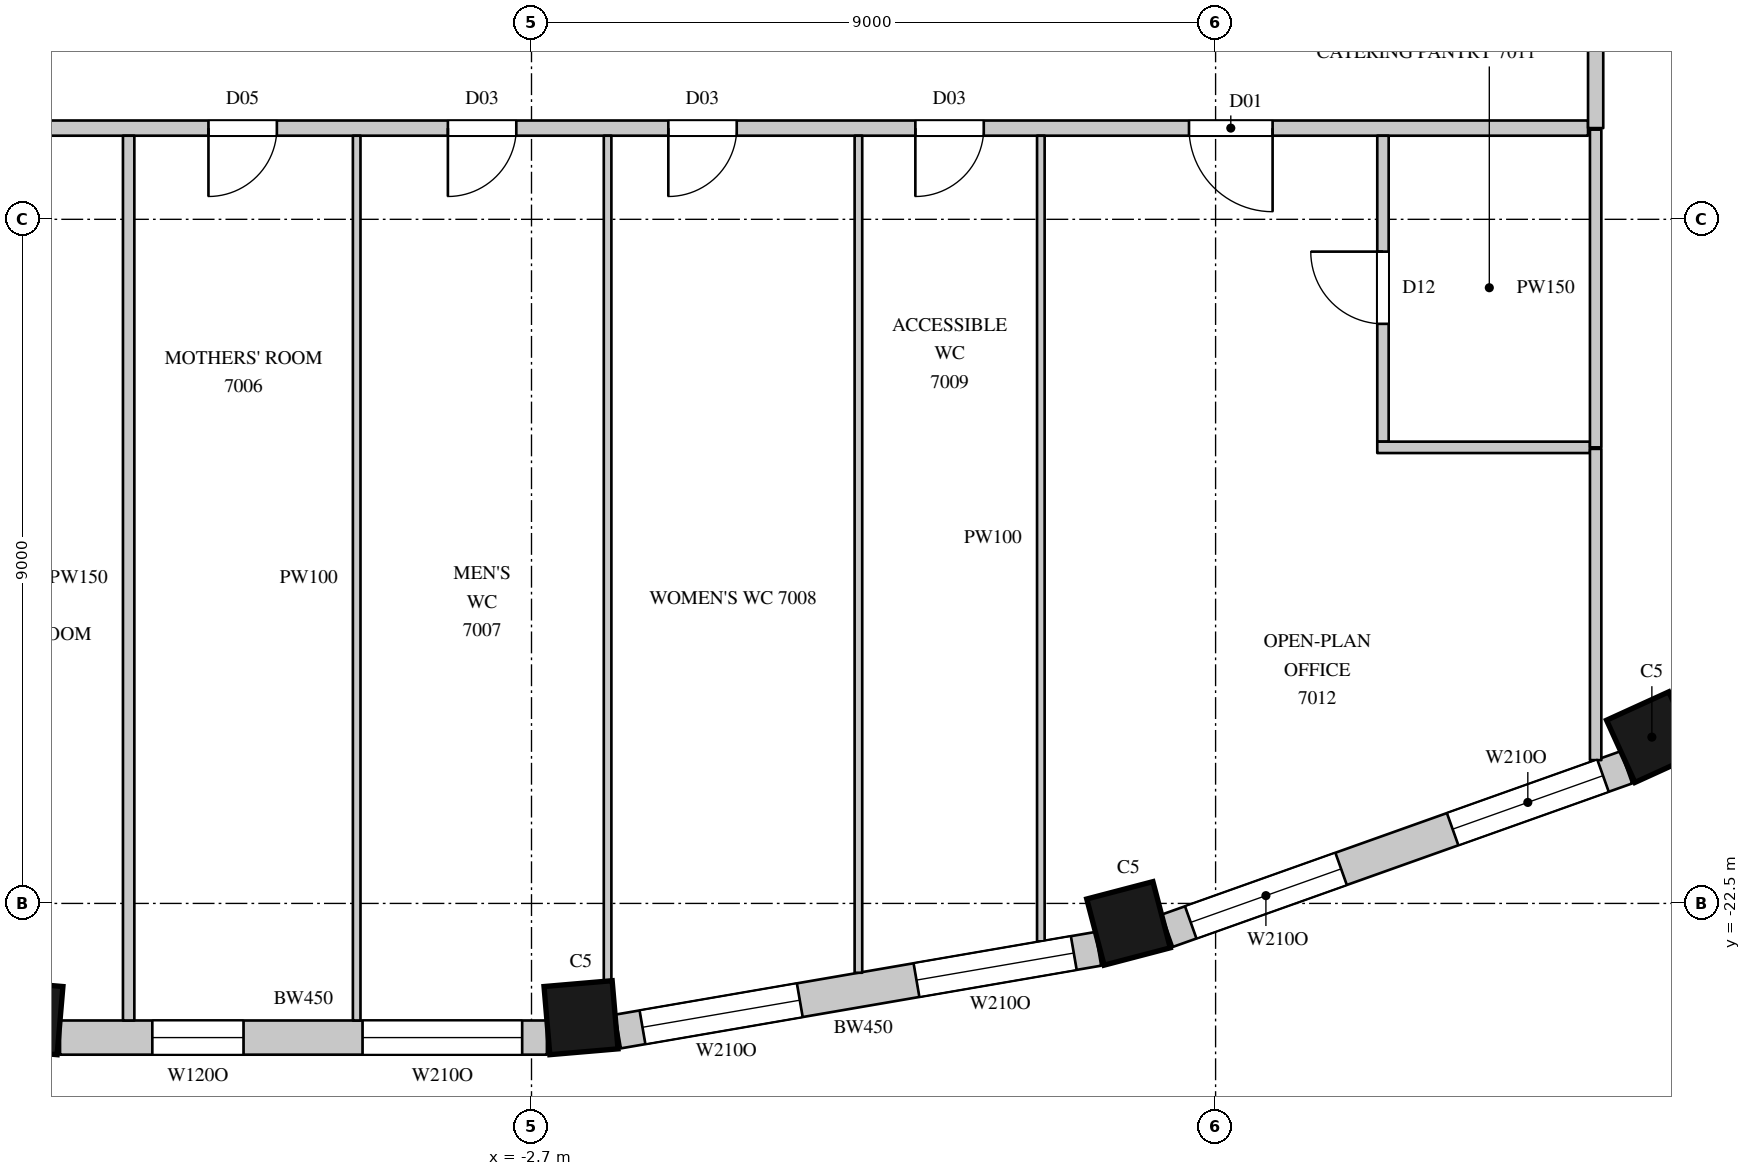
"""IFC4 building model, lengths in metres.
Left out: names, types, materials, properties, quantities, classifications, styles, units other than length and angle.
Written with IfcOpenShell. Run it as: python <this file> out.ifc"""

import sys

from ifc_helpers import new_model, si_unit, direction, frame, frame_2d, origin, origin_2d, place, context, subcontext, project, spatial, rectangle, extrude, element, fill, save


model = new_model("IFC4")
c1 = context("Model", 3, precision=1e-05, world=origin(), true_north=direction((0.0, 1.0)))
c2 = subcontext(c1, "Body", "Model", "MODEL_VIEW")
j1 = project(units=[si_unit("LENGTHUNIT", "METRE"), si_unit("PLANEANGLEUNIT", "RADIAN")], contexts=[c1])
p1 = place(None, origin())
s1 = spatial("IfcSite", under=j1, at=p1, CompositionType="ELEMENT")
p2 = place(p1, origin())
s2 = spatial("IfcBuilding", under=s1, at=p2, CompositionType="ELEMENT")
p3 = place(p2, frame((0.0, 0.0, 309.0)))
s3 = spatial("IfcBuildingStorey", under=s2, at=p3, CompositionType="ELEMENT", Elevation=309.0)
for number, where, z_axis, x_axis in (
    (1, (-9.351, -24.003, 0.0), (0.0, 0.0, 1.0), (0.996, -0.085, 0.0)),
    (2, (-2.049, -24.003, 0.0), (0.0, 0.0, 1.0), (0.996, 0.085, 0.0)),
    (3, (5.154, -22.763, 0.0), (0.0, 0.0, 1.0), (0.967, 0.253, 0.0)),
    (4, (12.04, -20.312, 0.0), (0.0, 0.0, 1.0), (0.91, 0.415, 0.0)),
):
    element("IfcColumn", number, at=place(p3, frame(where, z_axis=z_axis, x_axis=x_axis)), inside=s3, PredefinedType="COLUMN", context=c2, shape_type="SweptSolid", body=[
        extrude(rectangle(XDim=0.9, YDim=0.9, at=origin_2d()), origin(), (0.0, 0.0, 1.0), 4.1),
    ])
p4 = place(p3, frame((-8.903, -24.265, 0.0), z_axis=(0.0, 0.0, 1.0), x_axis=(1.0, 0.0, 0.0)))
e5 = element("IfcWall", 5, at=p4, inside=s3, PredefinedType="SOLIDWALL", context=c2, shape_type="SweptSolid", body=[
    extrude(rectangle(XDim=6.406, YDim=0.45, at=frame_2d((3.203, 0.0))), origin(), (0.0, 0.0, 1.0), 3.8),
])
p5 = place(p4, frame((3.98, 0.0, 1.05)))
e6 = element("IfcOpeningElement", 6, at=p5, cuts=e5, PredefinedType="OPENING", context=c2, shape_type="SweptSolid", body=[
    extrude(rectangle(XDim=2.1, YDim=2.4, at=frame_2d((1.05, 1.2))), frame((0.0, 0.235, 0.0), z_axis=(0.0, -1.0, 0.0), x_axis=(1.0, 0.0, 0.0)), (0.0, 0.0, 1.0), 0.47),
])
p6 = place(p4, frame((1.214, 0.0, 1.05)))
e7 = element("IfcOpeningElement", 7, at=p6, cuts=e5, PredefinedType="OPENING", context=c2, shape_type="SweptSolid", body=[
    extrude(rectangle(XDim=1.2, YDim=2.4, at=frame_2d((0.6, 1.2))), frame((0.0, 0.235, 0.0), z_axis=(0.0, -1.0, 0.0), x_axis=(1.0, 0.0, 0.0)), (0.0, 0.0, 1.0), 0.47),
])
p7 = place(p3, frame((-1.562, -24.185, 0.0), z_axis=(0.0, 0.0, 1.0), x_axis=(0.985502073964, 0.169663379113, 0.0)))
e8 = element("IfcWall", 8, at=p7, inside=s3, PredefinedType="SOLIDWALL", context=c2, shape_type="SweptSolid", body=[
    extrude(rectangle(XDim=6.412, YDim=0.45, at=frame_2d((3.206, 0.0))), origin(), (0.0, 0.0, 1.0), 3.8),
])
p8 = place(p7, frame((0.327, 0.0, 1.05)))
e9 = element("IfcOpeningElement", 9, at=p8, cuts=e8, PredefinedType="OPENING", context=c2, shape_type="SweptSolid", body=[
    extrude(rectangle(XDim=2.1, YDim=2.4, at=frame_2d((1.05, 1.2))), frame((0.0, 0.235, 0.0), z_axis=(0.0, -1.0, 0.0), x_axis=(1.0, 0.0, 0.0)), (0.0, 0.0, 1.0), 0.47),
])
p9 = place(p7, frame((3.985, 0.0, 1.05)))
e10 = element("IfcOpeningElement", 10, at=p9, cuts=e8, PredefinedType="OPENING", context=c2, shape_type="SweptSolid", body=[
    extrude(rectangle(XDim=2.1, YDim=2.4, at=frame_2d((1.05, 1.2))), frame((0.0, 0.235, 0.0), z_axis=(0.0, -1.0, 0.0), x_axis=(1.0, 0.0, 0.0)), (0.0, 0.0, 1.0), 0.47),
])
p10 = place(p3, frame((5.665, -22.859, 0.0), z_axis=(0.0, 0.0, 1.0), x_axis=(0.942108340262, 0.335308626803, 0.0)))
e11 = element("IfcWall", 11, at=p10, inside=s3, PredefinedType="SOLIDWALL", context=c2, shape_type="SweptSolid", body=[
    extrude(rectangle(XDim=6.412, YDim=0.45, at=frame_2d((3.206, 0.0))), origin(), (0.0, 0.0, 1.0), 3.8),
])
p11 = place(p10, frame((0.327, 0.0, 1.05)))
e12 = element("IfcOpeningElement", 12, at=p11, cuts=e11, PredefinedType="OPENING", context=c2, shape_type="SweptSolid", body=[
    extrude(rectangle(XDim=2.1, YDim=2.4, at=frame_2d((1.05, 1.2))), frame((0.0, 0.235, 0.0), z_axis=(0.0, -1.0, 0.0), x_axis=(1.0, 0.0, 0.0)), (0.0, 0.0, 1.0), 0.47),
])
p12 = place(p10, frame((3.985, 0.0, 1.05)))
e13 = element("IfcOpeningElement", 13, at=p12, cuts=e11, PredefinedType="OPENING", context=c2, shape_type="SweptSolid", body=[
    extrude(rectangle(XDim=2.1, YDim=2.4, at=frame_2d((1.05, 1.2))), frame((0.0, 0.235, 0.0), z_axis=(0.0, -1.0, 0.0), x_axis=(1.0, 0.0, 0.0)), (0.0, 0.0, 1.0), 0.47),
])
p13 = place(p3, frame((-10.9, -12.3, 0.0), z_axis=(0.0, 0.0, 1.0), x_axis=(1.0, 0.0, 0.0)))
e14 = element("IfcWall", 14, at=p13, inside=s3, PredefinedType="PARTITIONING", context=c2, shape_type="SweptSolid", body=[
    extrude(rectangle(XDim=22.1, YDim=0.2, at=frame_2d((11.05, 0.0))), origin(), (0.0, 0.0, 1.0), 3.8),
])
p14 = place(p13, frame((0.95, 0.0, 0.0)))
e15 = element("IfcOpeningElement", 15, at=p14, cuts=e14, PredefinedType="OPENING", context=c2, shape_type="SweptSolid", body=[
    extrude(rectangle(XDim=0.9, YDim=2.2, at=frame_2d((0.45, 1.1))), frame((0.0, 0.11, 0.0), z_axis=(0.0, -1.0, 0.0), x_axis=(1.0, 0.0, 0.0)), (0.0, 0.0, 1.0), 0.22),
])
p15 = place(p13, frame((3.95, 0.0, 0.0)))
e16 = element("IfcOpeningElement", 16, at=p15, cuts=e14, PredefinedType="OPENING", context=c2, shape_type="SweptSolid", body=[
    extrude(rectangle(XDim=0.9, YDim=2.2, at=frame_2d((0.45, 1.1))), frame((0.0, 0.11, 0.0), z_axis=(0.0, -1.0, 0.0), x_axis=(1.0, 0.0, 0.0)), (0.0, 0.0, 1.0), 0.22),
])
p16 = place(p13, frame((7.1, 0.0, 0.0)))
e17 = element("IfcOpeningElement", 17, at=p16, cuts=e14, PredefinedType="OPENING", context=c2, shape_type="SweptSolid", body=[
    extrude(rectangle(XDim=0.9, YDim=2.2, at=frame_2d((0.45, 1.1))), frame((0.0, 0.11, 0.0), z_axis=(0.0, -1.0, 0.0), x_axis=(1.0, 0.0, 0.0)), (0.0, 0.0, 1.0), 0.22),
])
p17 = place(p13, frame((10.0, 0.0, 0.0)))
e18 = element("IfcOpeningElement", 18, at=p17, cuts=e14, PredefinedType="OPENING", context=c2, shape_type="SweptSolid", body=[
    extrude(rectangle(XDim=0.9, YDim=2.2, at=frame_2d((0.45, 1.1))), frame((0.0, 0.11, 0.0), z_axis=(0.0, -1.0, 0.0), x_axis=(1.0, 0.0, 0.0)), (0.0, 0.0, 1.0), 0.22),
])
p18 = place(p13, frame((13.25, 0.0, 0.0)))
e19 = element("IfcOpeningElement", 19, at=p18, cuts=e14, PredefinedType="OPENING", context=c2, shape_type="SweptSolid", body=[
    extrude(rectangle(XDim=0.9, YDim=2.2, at=frame_2d((0.45, 1.1))), frame((0.0, 0.11, 0.0), z_axis=(0.0, -1.0, 0.0), x_axis=(1.0, 0.0, 0.0)), (0.0, 0.0, 1.0), 0.22),
])
p19 = place(p13, frame((16.85, 0.0, 0.0)))
e20 = element("IfcOpeningElement", 20, at=p19, cuts=e14, PredefinedType="OPENING", context=c2, shape_type="SweptSolid", body=[
    extrude(rectangle(XDim=1.1, YDim=2.4, at=frame_2d((0.55, 1.2))), frame((0.0, 0.11, 0.0), z_axis=(0.0, -1.0, 0.0), x_axis=(1.0, 0.0, 0.0)), (0.0, 0.0, 1.0), 0.22),
])
p20 = place(p3, frame((11.3, -12.3, 0.0), z_axis=(0.0, 0.0, 1.0), x_axis=(0.0, 1.0, 0.0)))
e21 = element("IfcWall", 21, at=p20, inside=s3, PredefinedType="PARTITIONING", context=c2, shape_type="SweptSolid", body=[
    extrude(rectangle(XDim=24.5, YDim=0.2, at=frame_2d((12.25, 0.0))), origin(), (0.0, 0.0, 1.0), 3.8),
])
p21 = place(p20, frame((10.15, 0.0, 0.0)))
e22 = element("IfcOpeningElement", 22, at=p21, cuts=e21, PredefinedType="OPENING", context=c2, shape_type="SweptSolid", body=[
    extrude(rectangle(XDim=1.5, YDim=2.4, at=frame_2d((0.75, 1.2))), frame((0.0, 0.11, 0.0), z_axis=(0.0, -1.0, 0.0), x_axis=(1.0, 0.0, 0.0)), (0.0, 0.0, 1.0), 0.22),
])
p22 = place(p3, frame((-8.0, -24.04, 0.0), z_axis=(0.0, 0.0, 1.0), x_axis=(0.0, 1.0, 0.0)))
e23 = element("IfcWall", 23, at=p22, inside=s3, PredefinedType="PARTITIONING", context=c2, shape_type="SweptSolid", body=[
    extrude(rectangle(XDim=11.64, YDim=0.15, at=frame_2d((5.82, 0.0))), origin(), (0.0, 0.0, 1.0), 3.8),
])
p23 = place(p3, frame((8.502, -16.425, 0.0), z_axis=(0.0, 0.0, 1.0), x_axis=(0.0, 1.0, 0.0)))
e24 = element("IfcWall", 24, at=p23, inside=s3, PredefinedType="PARTITIONING", context=c2, shape_type="SweptSolid", body=[
    extrude(rectangle(XDim=4.025, YDim=0.15, at=frame_2d((2.013, 0.0))), origin(), (0.0, 0.0, 1.0), 3.8),
])
p24 = place(p23, frame((1.55, 0.0, 0.0)))
e25 = element("IfcOpeningElement", 25, at=p24, cuts=e24, PredefinedType="OPENING", context=c2, shape_type="SweptSolid", body=[
    extrude(rectangle(XDim=0.95, YDim=2.2, at=frame_2d((0.475, 1.1))), frame((0.0, 0.085, 0.0), z_axis=(0.0, -1.0, 0.0), x_axis=(1.0, 0.0, 0.0)), (0.0, 0.0, 1.0), 0.17),
])
p25 = place(p3, frame((8.427, -16.5, 0.0), z_axis=(0.0, 0.0, 1.0), x_axis=(1.0, 0.0, 0.0)))
e26 = element("IfcWall", 26, at=p25, inside=s3, PredefinedType="PARTITIONING", context=c2, shape_type="SweptSolid", body=[
    extrude(rectangle(XDim=2.798, YDim=0.15, at=frame_2d((1.399, 0.0))), origin(), (0.0, 0.0, 1.0), 3.8),
])
p26 = place(p3, frame((11.3, -20.615, 0.0), z_axis=(0.0, 0.0, 1.0), x_axis=(0.0, 1.0, 0.0)))
e27 = element("IfcWall", 27, at=p26, inside=s3, PredefinedType="PARTITIONING", context=c2, shape_type="SweptSolid", body=[
    extrude(rectangle(XDim=4.095, YDim=0.15, at=frame_2d((2.047, 0.0))), origin(), (0.0, 0.0, 1.0), 3.8),
])
p27 = place(p3, frame((11.3, -16.5, 0.0), z_axis=(0.0, 0.0, 1.0), x_axis=(0.0, 1.0, 0.0)))
e28 = element("IfcWall", 28, at=p27, inside=s3, PredefinedType="PARTITIONING", context=c2, shape_type="SweptSolid", body=[
    extrude(rectangle(XDim=4.18, YDim=0.15, at=frame_2d((2.09, 0.0))), origin(), (0.0, 0.0, 1.0), 3.8),
])
p28 = place(p3, frame((-5.0, -24.04, 0.0), z_axis=(0.0, 0.0, 1.0), x_axis=(0.0, 1.0, 0.0)))
e29 = element("IfcWall", 29, at=p28, inside=s3, PredefinedType="PARTITIONING", context=c2, shape_type="SweptSolid", body=[
    extrude(rectangle(XDim=11.64, YDim=0.1, at=frame_2d((5.82, 0.0))), origin(), (0.0, 0.0, 1.0), 3.8),
])
p29 = place(p3, frame((-1.699, -23.522, 0.0), z_axis=(0.0, 0.0, 1.0), x_axis=(0.0, 1.0, 0.0)))
e30 = element("IfcWall", 30, at=p29, inside=s3, PredefinedType="PARTITIONING", context=c2, shape_type="SweptSolid", body=[
    extrude(rectangle(XDim=11.122, YDim=0.1, at=frame_2d((5.561, 0.0))), origin(), (0.0, 0.0, 1.0), 3.8),
])
p30 = place(p3, frame((1.601, -23.412, 0.0), z_axis=(0.0, 0.0, 1.0), x_axis=(0.0, 1.0, 0.0)))
e31 = element("IfcWall", 31, at=p30, inside=s3, PredefinedType="PARTITIONING", context=c2, shape_type="SweptSolid", body=[
    extrude(rectangle(XDim=11.012, YDim=0.1, at=frame_2d((5.506, 0.0))), origin(), (0.0, 0.0, 1.0), 3.8),
])
p31 = place(p3, frame((4.001, -22.999, 0.0), z_axis=(0.0, 0.0, 1.0), x_axis=(0.0, 1.0, 0.0)))
e32 = element("IfcWall", 32, at=p31, inside=s3, PredefinedType="PARTITIONING", context=c2, shape_type="SweptSolid", body=[
    extrude(rectangle(XDim=10.599, YDim=0.1, at=frame_2d((5.3, 0.0))), origin(), (0.0, 0.0, 1.0), 3.8),
])
p32 = place(p5, origin())
e33 = element("IfcWindow", 33, at=p32, inside=s3, PartitioningType="SINGLE_PANEL", PredefinedType="WINDOW", context=c2, shape_type="SweptSolid", body=[
    extrude(rectangle(XDim=2.1, YDim=2.4, at=frame_2d((1.05, 1.2))), frame((0.0, 0.135, 0.0), z_axis=(0.0, -1.0, 0.0), x_axis=(1.0, 0.0, 0.0)), (0.0, 0.0, 1.0), 0.06),
])
fill(e6, e33)
p33 = place(p8, origin())
e34 = element("IfcWindow", 34, at=p33, inside=s3, PartitioningType="SINGLE_PANEL", PredefinedType="WINDOW", context=c2, shape_type="SweptSolid", body=[
    extrude(rectangle(XDim=2.1, YDim=2.4, at=frame_2d((1.05, 1.2))), frame((0.0, 0.135, 0.0), z_axis=(0.0, -1.0, 0.0), x_axis=(1.0, 0.0, 0.0)), (0.0, 0.0, 1.0), 0.06),
])
fill(e9, e34)
p34 = place(p9, origin())
e35 = element("IfcWindow", 35, at=p34, inside=s3, PartitioningType="SINGLE_PANEL", PredefinedType="WINDOW", context=c2, shape_type="SweptSolid", body=[
    extrude(rectangle(XDim=2.1, YDim=2.4, at=frame_2d((1.05, 1.2))), frame((0.0, 0.135, 0.0), z_axis=(0.0, -1.0, 0.0), x_axis=(1.0, 0.0, 0.0)), (0.0, 0.0, 1.0), 0.06),
])
fill(e10, e35)
p35 = place(p11, origin())
e36 = element("IfcWindow", 36, at=p35, inside=s3, PartitioningType="SINGLE_PANEL", PredefinedType="WINDOW", context=c2, shape_type="SweptSolid", body=[
    extrude(rectangle(XDim=2.1, YDim=2.4, at=frame_2d((1.05, 1.2))), frame((0.0, 0.135, 0.0), z_axis=(0.0, -1.0, 0.0), x_axis=(1.0, 0.0, 0.0)), (0.0, 0.0, 1.0), 0.06),
])
fill(e12, e36)
p36 = place(p12, origin())
e37 = element("IfcWindow", 37, at=p36, inside=s3, PartitioningType="SINGLE_PANEL", PredefinedType="WINDOW", context=c2, shape_type="SweptSolid", body=[
    extrude(rectangle(XDim=2.1, YDim=2.4, at=frame_2d((1.05, 1.2))), frame((0.0, 0.135, 0.0), z_axis=(0.0, -1.0, 0.0), x_axis=(1.0, 0.0, 0.0)), (0.0, 0.0, 1.0), 0.06),
])
fill(e13, e37)
p37 = place(p15, origin())
e38 = element("IfcDoor", 38, at=p37, inside=s3, OperationType="SINGLE_SWING_RIGHT", PredefinedType="DOOR", context=c2, shape_type="SweptSolid", body=[
    extrude(rectangle(XDim=0.9, YDim=2.2, at=frame_2d((0.45, 1.1))), frame((0.0, 0.025, 0.0), z_axis=(0.0, -1.0, 0.0), x_axis=(1.0, 0.0, 0.0)), (0.0, 0.0, 1.0), 0.05),
])
fill(e16, e38)
p38 = place(p16, origin())
e39 = element("IfcDoor", 39, at=p38, inside=s3, OperationType="SINGLE_SWING_RIGHT", PredefinedType="DOOR", context=c2, shape_type="SweptSolid", body=[
    extrude(rectangle(XDim=0.9, YDim=2.2, at=frame_2d((0.45, 1.1))), frame((0.0, 0.025, 0.0), z_axis=(0.0, -1.0, 0.0), x_axis=(1.0, 0.0, 0.0)), (0.0, 0.0, 1.0), 0.05),
])
fill(e17, e39)
p39 = place(p17, origin())
e40 = element("IfcDoor", 40, at=p39, inside=s3, OperationType="SINGLE_SWING_RIGHT", PredefinedType="DOOR", context=c2, shape_type="SweptSolid", body=[
    extrude(rectangle(XDim=0.9, YDim=2.2, at=frame_2d((0.45, 1.1))), frame((0.0, 0.025, 0.0), z_axis=(0.0, -1.0, 0.0), x_axis=(1.0, 0.0, 0.0)), (0.0, 0.0, 1.0), 0.05),
])
fill(e18, e40)
p40 = place(p18, origin())
e41 = element("IfcDoor", 41, at=p40, inside=s3, OperationType="SINGLE_SWING_RIGHT", PredefinedType="DOOR", context=c2, shape_type="SweptSolid", body=[
    extrude(rectangle(XDim=0.9, YDim=2.2, at=frame_2d((0.45, 1.1))), frame((0.0, 0.025, 0.0), z_axis=(0.0, -1.0, 0.0), x_axis=(1.0, 0.0, 0.0)), (0.0, 0.0, 1.0), 0.05),
])
fill(e19, e41)
p41 = place(p19, origin())
e42 = element("IfcDoor", 42, at=p41, inside=s3, OperationType="SINGLE_SWING_LEFT", PredefinedType="DOOR", context=c2, shape_type="SweptSolid", body=[
    extrude(rectangle(XDim=1.1, YDim=2.4, at=frame_2d((0.55, 1.2))), frame((0.0, 0.025, 0.0), z_axis=(0.0, -1.0, 0.0), x_axis=(1.0, 0.0, 0.0)), (0.0, 0.0, 1.0), 0.05),
])
fill(e20, e42)
p42 = place(p24, origin())
e43 = element("IfcDoor", 43, at=p42, inside=s3, OperationType="SINGLE_SWING_RIGHT", PredefinedType="DOOR", context=c2, shape_type="SweptSolid", body=[
    extrude(rectangle(XDim=0.95, YDim=2.2, at=frame_2d((0.475, 1.1))), frame((0.0, 0.025, 0.0), z_axis=(0.0, -1.0, 0.0), x_axis=(1.0, 0.0, 0.0)), (0.0, 0.0, 1.0), 0.05),
])
fill(e25, e43)
p43 = place(p6, origin())
e44 = element("IfcWindow", 44, at=p43, inside=s3, PartitioningType="SINGLE_PANEL", PredefinedType="WINDOW", context=c2, shape_type="SweptSolid", body=[
    extrude(rectangle(XDim=1.2, YDim=2.4, at=frame_2d((0.6, 1.2))), frame((0.0, 0.135, 0.0), z_axis=(0.0, -1.0, 0.0), x_axis=(1.0, 0.0, 0.0)), (0.0, 0.0, 1.0), 0.06),
])
fill(e7, e44)
save(model, sys.argv[1])
